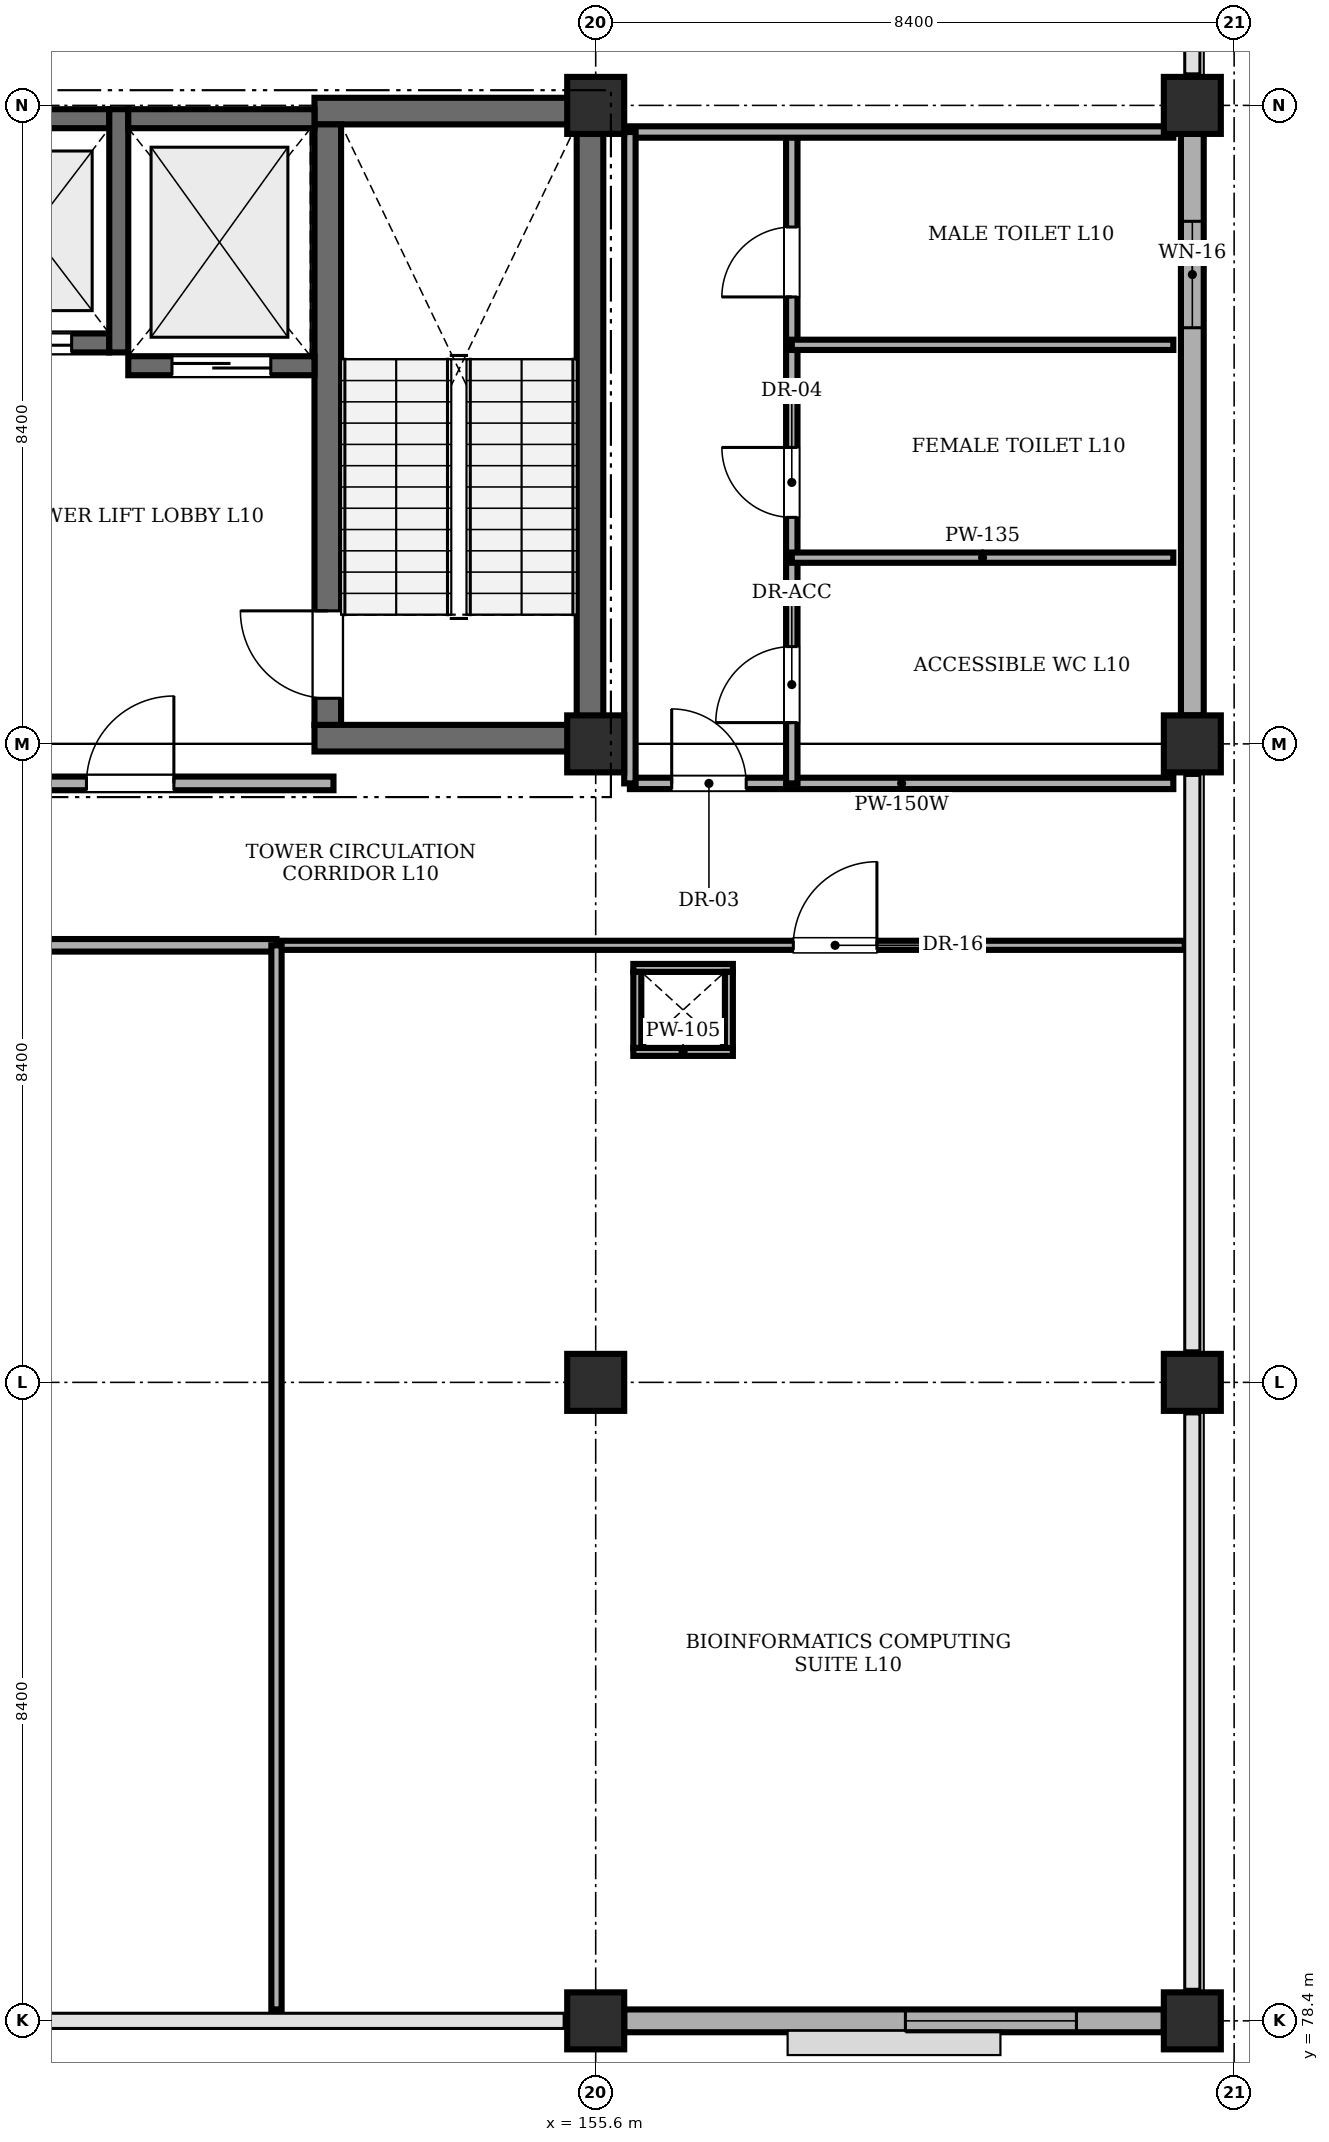
"""IFC4 building model, lengths in metres.
Left out: names, types, materials, properties, quantities, classifications, styles, units other than length and angle.
Written with IfcOpenShell. Run it as: python <this file> out.ifc"""

import sys

from ifc_helpers import new_model, si_unit, direction, frame, frame_2d, origin, origin_2d, place, context, subcontext, project, spatial, rectangle, extrude, element, fill, save


model = new_model("IFC4")
c1 = context("Model", 3, precision=1e-05, world=origin(), true_north=direction((0.0, 1.0)))
c2 = subcontext(c1, "Body", "Model", "MODEL_VIEW")
j1 = project(units=[si_unit("LENGTHUNIT", "METRE"), si_unit("PLANEANGLEUNIT", "RADIAN")], contexts=[c1])
p1 = place(None, origin())
s1 = spatial("IfcSite", under=j1, at=p1, CompositionType="ELEMENT")
p2 = place(p1, origin())
s2 = spatial("IfcBuilding", under=s1, at=p2, CompositionType="ELEMENT")
p3 = place(p2, frame((0.0, 0.0, 40.2)))
s3 = spatial("IfcBuildingStorey", under=s2, at=p3, CompositionType="ELEMENT", Elevation=40.2)
for number, where, z_axis, x_axis in (
    (1, (155.6, 78.4, 0.0), (0.0, 0.0, 1.0), (1.0, 0.0, 0.0)),
    (2, (155.6, 86.8, 0.0), (0.0, 0.0, 1.0), (1.0, 0.0, 0.0)),
    (3, (155.6, 95.2, 0.0), (0.0, 0.0, 1.0), (1.0, 0.0, 0.0)),
    (4, (155.6, 103.6, 0.0), (0.0, 0.0, 1.0), (1.0, 0.0, 0.0)),
    (5, (163.45, 78.4, 0.0), (0.0, 0.0, 1.0), (1.0, 0.0, 0.0)),
    (6, (163.45, 86.8, 0.0), (0.0, 0.0, 1.0), (1.0, 0.0, 0.0)),
    (7, (163.45, 95.2, 0.0), (0.0, 0.0, 1.0), (1.0, 0.0, 0.0)),
    (8, (163.45, 103.6, 0.0), (0.0, 0.0, 1.0), (1.0, 0.0, 0.0)),
):
    element("IfcColumn", number, at=place(p3, frame(where, z_axis=z_axis, x_axis=x_axis)), inside=s3, PredefinedType="COLUMN", context=c2, shape_type="SweptSolid", body=[
        extrude(rectangle(XDim=0.75, YDim=0.75, at=origin_2d()), origin(), (0.0, 0.0, 1.0), 4.0),
    ])
for number, where, z_axis, x_axis in (
    (9, (151.9, 95.275, 0.0), (0.0, 0.0, 1.0), (1.0, 0.0, 0.0)),
    (10, (151.9, 103.525, 0.0), (0.0, 0.0, 1.0), (1.0, 0.0, 0.0)),
):
    element("IfcWall", number, at=place(p3, frame(where, z_axis=z_axis, x_axis=x_axis)), inside=s3, PredefinedType="SHEAR", context=c2, shape_type="SweptSolid", body=[
        extrude(rectangle(XDim=3.8, YDim=0.35, at=frame_2d((1.9, 0.0))), origin(), (0.0, 0.0, 1.0), 4.0),
    ])
p4 = place(p3, frame((152.075, 95.45, 0.0), z_axis=(0.0, 0.0, 1.0), x_axis=(0.0, 1.0, 0.0)))
e11 = element("IfcWall", 11, at=p4, inside=s3, PredefinedType="SHEAR", context=c2, shape_type="SweptSolid", body=[
    extrude(rectangle(XDim=7.9, YDim=0.35, at=frame_2d((3.95, 0.0))), origin(), (0.0, 0.0, 1.0), 4.0),
])
p5 = place(p4, frame((0.35, 0.0, 0.0)))
e12 = element("IfcOpeningElement", 12, at=p5, cuts=e11, PredefinedType="OPENING", context=c2, shape_type="SweptSolid", body=[
    extrude(rectangle(XDim=1.15, YDim=2.15, at=frame_2d((0.575, 1.075))), frame((0.0, 0.185, 0.0), z_axis=(0.0, -1.0, 0.0), x_axis=(1.0, 0.0, 0.0)), (0.0, 0.0, 1.0), 0.37),
])
p6 = place(p3, frame((155.525, 95.45, 0.0), z_axis=(0.0, 0.0, 1.0), x_axis=(0.0, 1.0, 0.0)))
e13 = element("IfcWall", 13, at=p6, inside=s3, PredefinedType="SHEAR", context=c2, shape_type="SweptSolid", body=[
    extrude(rectangle(XDim=7.9, YDim=0.35, at=frame_2d((3.95, 0.0))), origin(), (0.0, 0.0, 1.0), 4.0),
])
p7 = place(p3, frame((147.15, 100.475, 0.0), z_axis=(0.0, 0.0, 1.0), x_axis=(1.0, 0.0, 0.0)))
e14 = element("IfcWall", 14, at=p7, inside=s3, PredefinedType="SHEAR", context=c2, shape_type="SweptSolid", body=[
    extrude(rectangle(XDim=2.05, YDim=0.25, at=frame_2d((1.025, 0.0))), origin(), (0.0, 0.0, 1.0), 4.0),
])
p8 = place(p7, frame((0.495, 0.0, 0.0)))
e15 = element("IfcOpeningElement", 15, at=p8, cuts=e14, PredefinedType="OPENING", context=c2, shape_type="SweptSolid", body=[
    extrude(rectangle(XDim=1.06, YDim=2.15, at=frame_2d((0.53, 1.075))), frame((0.0, 0.135, 0.0), z_axis=(0.0, -1.0, 0.0), x_axis=(1.0, 0.0, 0.0)), (0.0, 0.0, 1.0), 0.27),
])
p9 = place(p3, frame((147.15, 103.425, 0.0), z_axis=(0.0, 0.0, 1.0), x_axis=(1.0, 0.0, 0.0)))
e16 = element("IfcWall", 16, at=p9, inside=s3, PredefinedType="SHEAR", context=c2, shape_type="SweptSolid", body=[
    extrude(rectangle(XDim=2.05, YDim=0.25, at=frame_2d((1.025, 0.0))), origin(), (0.0, 0.0, 1.0), 4.0),
])
p10 = place(p3, frame((149.325, 100.35, 0.0), z_axis=(0.0, 0.0, 1.0), x_axis=(0.0, 1.0, 0.0)))
e17 = element("IfcWall", 17, at=p10, inside=s3, PredefinedType="SHEAR", context=c2, shape_type="SweptSolid", body=[
    extrude(rectangle(XDim=3.2, YDim=0.25, at=frame_2d((1.6, 0.0))), origin(), (0.0, 0.0, 1.0), 4.0),
])
p11 = place(p3, frame((149.45, 100.175, 0.0), z_axis=(0.0, 0.0, 1.0), x_axis=(1.0, 0.0, 0.0)))
e18 = element("IfcWall", 18, at=p11, inside=s3, PredefinedType="SHEAR", context=c2, shape_type="SweptSolid", body=[
    extrude(rectangle(XDim=2.45, YDim=0.25, at=frame_2d((1.225, 0.0))), origin(), (0.0, 0.0, 1.0), 4.0),
])
p12 = place(p11, frame((0.575, 0.0, 0.0)))
e19 = element("IfcOpeningElement", 19, at=p12, cuts=e18, PredefinedType="OPENING", context=c2, shape_type="SweptSolid", body=[
    extrude(rectangle(XDim=1.3, YDim=2.25, at=frame_2d((0.65, 1.125))), frame((0.0, 0.135, 0.0), z_axis=(0.0, -1.0, 0.0), x_axis=(1.0, 0.0, 0.0)), (0.0, 0.0, 1.0), 0.27),
])
p13 = place(p3, frame((149.45, 103.425, 0.0), z_axis=(0.0, 0.0, 1.0), x_axis=(1.0, 0.0, 0.0)))
e20 = element("IfcWall", 20, at=p13, inside=s3, PredefinedType="SHEAR", context=c2, shape_type="SweptSolid", body=[
    extrude(rectangle(XDim=2.45, YDim=0.25, at=frame_2d((1.225, 0.0))), origin(), (0.0, 0.0, 1.0), 4.0),
])
p14 = place(p3, frame((163.075, 78.4, 0.0), z_axis=(0.0, 0.0, 1.0), x_axis=(-1.0, 0.0, 0.0)))
e21 = element("IfcWall", 21, at=p14, inside=s3, PredefinedType="STANDARD", context=c2, shape_type="SweptSolid", body=[
    extrude(rectangle(XDim=7.1, YDim=0.3, at=frame_2d((3.55, 0.0))), origin(), (0.0, 0.0, 1.0), 3.3),
])
p15 = place(p14, frame((1.15, 0.0, 0.95)))
e22 = element("IfcOpeningElement", 22, at=p15, cuts=e21, PredefinedType="OPENING", context=c2, shape_type="SweptSolid", body=[
    extrude(rectangle(XDim=2.25, YDim=1.95, at=frame_2d((1.125, 0.975))), frame((0.0, 0.16, 0.0), z_axis=(0.0, -1.0, 0.0), x_axis=(1.0, 0.0, 0.0)), (0.0, 0.0, 1.0), 0.32),
])
p16 = place(p3, frame((163.45, 103.225, 0.0), z_axis=(0.0, 0.0, 1.0), x_axis=(0.0, -1.0, 0.0)))
e23 = element("IfcWall", 23, at=p16, inside=s3, PredefinedType="STANDARD", context=c2, shape_type="SweptSolid", body=[
    extrude(rectangle(XDim=7.65, YDim=0.3, at=frame_2d((3.825, 0.0))), origin(), (0.0, 0.0, 1.0), 3.3),
])
p17 = place(p16, frame((1.15, 0.0, 1.1)))
e24 = element("IfcOpeningElement", 24, at=p17, cuts=e23, PredefinedType="OPENING", context=c2, shape_type="SweptSolid", body=[
    extrude(rectangle(XDim=1.4, YDim=1.4, at=frame_2d((0.7, 0.7))), frame((0.0, 0.16, 0.0), z_axis=(0.0, -1.0, 0.0), x_axis=(1.0, 0.0, 0.0)), (0.0, 0.0, 1.0), 0.32),
])
p18 = place(p3, frame((147.3, 94.68, 0.0), z_axis=(0.0, 0.0, 1.0), x_axis=(1.0, 0.0, 0.0)))
e25 = element("IfcWall", 25, at=p18, inside=s3, PredefinedType="STANDARD", context=c2, shape_type="SweptSolid", body=[
    extrude(rectangle(XDim=4.85, YDim=0.18, at=frame_2d((2.425, 0.0))), origin(), (0.0, 0.0, 1.0), 4.0),
])
p19 = place(p18, frame((1.6, 0.0, 0.0)))
e26 = element("IfcOpeningElement", 26, at=p19, cuts=e25, PredefinedType="OPENING", context=c2, shape_type="SweptSolid", body=[
    extrude(rectangle(XDim=1.15, YDim=2.15, at=frame_2d((0.575, 1.075))), frame((0.0, 0.1, 0.0), z_axis=(0.0, -1.0, 0.0), x_axis=(1.0, 0.0, 0.0)), (0.0, 0.0, 1.0), 0.2),
])
p20 = place(p3, frame((156.05, 94.68, 0.0), z_axis=(0.0, 0.0, 1.0), x_axis=(1.0, 0.0, 0.0)))
e27 = element("IfcWall", 27, at=p20, inside=s3, PredefinedType="PARTITIONING", context=c2, shape_type="SweptSolid", body=[
    extrude(rectangle(XDim=7.15, YDim=0.15, at=frame_2d((3.575, 0.0))), origin(), (0.0, 0.0, 1.0), 4.0),
])
p21 = place(p20, frame((0.55, 0.0, 0.0)))
e28 = element("IfcOpeningElement", 28, at=p21, cuts=e27, PredefinedType="OPENING", context=c2, shape_type="SweptSolid", body=[
    extrude(rectangle(XDim=0.98, YDim=2.12, at=frame_2d((0.49, 1.06))), frame((0.0, 0.085, 0.0), z_axis=(0.0, -1.0, 0.0), x_axis=(1.0, 0.0, 0.0)), (0.0, 0.0, 1.0), 0.17),
])
p22 = place(p3, frame((158.18, 94.68, 0.0), z_axis=(0.0, 0.0, 1.0), x_axis=(0.0, 1.0, 0.0)))
e29 = element("IfcWall", 29, at=p22, inside=s3, PredefinedType="PARTITIONING", context=c2, shape_type="SweptSolid", body=[
    extrude(rectangle(XDim=8.57, YDim=0.15, at=frame_2d((4.285, 0.0))), origin(), (0.0, 0.0, 1.0), 4.0),
])
p23 = place(p22, frame((0.8, 0.0, 0.0)))
e30 = element("IfcOpeningElement", 30, at=p23, cuts=e29, PredefinedType="OPENING", context=c2, shape_type="SweptSolid", body=[
    extrude(rectangle(XDim=1.0, YDim=2.12, at=frame_2d((0.5, 1.06))), frame((0.0, 0.085, 0.0), z_axis=(0.0, -1.0, 0.0), x_axis=(1.0, 0.0, 0.0)), (0.0, 0.0, 1.0), 0.17),
])
p24 = place(p22, frame((3.5, 0.0, 0.0)))
e31 = element("IfcOpeningElement", 31, at=p24, cuts=e29, PredefinedType="OPENING", context=c2, shape_type="SweptSolid", body=[
    extrude(rectangle(XDim=0.92, YDim=2.1, at=frame_2d((0.46, 1.05))), frame((0.0, 0.085, 0.0), z_axis=(0.0, -1.0, 0.0), x_axis=(1.0, 0.0, 0.0)), (0.0, 0.0, 1.0), 0.17),
])
p25 = place(p22, frame((6.4, 0.0, 0.0)))
e32 = element("IfcOpeningElement", 32, at=p25, cuts=e29, PredefinedType="OPENING", context=c2, shape_type="SweptSolid", body=[
    extrude(rectangle(XDim=0.92, YDim=2.1, at=frame_2d((0.46, 1.05))), frame((0.0, 0.085, 0.0), z_axis=(0.0, -1.0, 0.0), x_axis=(1.0, 0.0, 0.0)), (0.0, 0.0, 1.0), 0.17),
])
for number, where, z_axis, x_axis in (
    (33, (158.18, 97.65, 0.0), (0.0, 0.0, 1.0), (1.0, 0.0, 0.0)),
    (34, (158.18, 100.45, 0.0), (0.0, 0.0, 1.0), (1.0, 0.0, 0.0)),
):
    element("IfcWall", number, at=place(p3, frame(where, z_axis=z_axis, x_axis=x_axis)), inside=s3, PredefinedType="PARTITIONING", context=c2, shape_type="SweptSolid", body=[
        extrude(rectangle(XDim=5.02, YDim=0.135, at=frame_2d((2.51, 0.0))), origin(), (0.0, 0.0, 1.0), 4.0),
    ])
p26 = place(p3, frame((156.05, 103.25, 0.0), z_axis=(0.0, 0.0, 1.0), x_axis=(1.0, 0.0, 0.0)))
e35 = element("IfcWall", 35, at=p26, inside=s3, PredefinedType="PARTITIONING", context=c2, shape_type="SweptSolid", body=[
    extrude(rectangle(XDim=7.15, YDim=0.15, at=frame_2d((3.575, 0.0))), origin(), (0.0, 0.0, 1.0), 4.0),
])
p27 = place(p3, frame((156.05, 94.68, 0.0), z_axis=(0.0, 0.0, 1.0), x_axis=(0.0, 1.0, 0.0)))
e36 = element("IfcWall", 36, at=p27, inside=s3, PredefinedType="PARTITIONING", context=c2, shape_type="SweptSolid", body=[
    extrude(rectangle(XDim=8.57, YDim=0.15, at=frame_2d((4.285, 0.0))), origin(), (0.0, 0.0, 1.0), 4.0),
])
p28 = place(p3, frame((138.8, 92.55, 0.0), z_axis=(0.0, 0.0, 1.0), x_axis=(1.0, 0.0, 0.0)))
e37 = element("IfcWall", 37, at=p28, inside=s3, PredefinedType="PARTITIONING", context=c2, shape_type="SweptSolid", body=[
    extrude(rectangle(XDim=12.6, YDim=0.165, at=frame_2d((6.3, 0.0))), origin(), (0.0, 0.0, 1.0), 4.0),
])
p29 = place(p28, frame((3.4, 0.0, 0.0)))
e38 = element("IfcOpeningElement", 38, at=p29, cuts=e37, PredefinedType="OPENING", context=c2, shape_type="SweptSolid", body=[
    extrude(rectangle(XDim=1.02, YDim=2.15, at=frame_2d((0.51, 1.075))), frame((0.0, 0.093, 0.0), z_axis=(0.0, -1.0, 0.0), x_axis=(1.0, 0.0, 0.0)), (0.0, 0.0, 1.0), 0.185),
])
p30 = place(p3, frame((151.4, 92.55, 0.0), z_axis=(0.0, 0.0, 1.0), x_axis=(1.0, 0.0, 0.0)))
e39 = element("IfcWall", 39, at=p30, inside=s3, PredefinedType="PARTITIONING", context=c2, shape_type="SweptSolid", body=[
    extrude(rectangle(XDim=11.95, YDim=0.12, at=frame_2d((5.975, 0.0))), origin(), (0.0, 0.0, 1.0), 4.0),
])
p31 = place(p30, frame((6.8, 0.0, 0.0)))
e40 = element("IfcOpeningElement", 40, at=p31, cuts=e39, PredefinedType="OPENING", context=c2, shape_type="SweptSolid", body=[
    extrude(rectangle(XDim=1.1, YDim=2.18, at=frame_2d((0.55, 1.09))), frame((0.0, 0.07, 0.0), z_axis=(0.0, -1.0, 0.0), x_axis=(1.0, 0.0, 0.0)), (0.0, 0.0, 1.0), 0.14),
])
p32 = place(p3, frame((151.4, 78.55, 0.0), z_axis=(0.0, 0.0, 1.0), x_axis=(0.0, 1.0, 0.0)))
e41 = element("IfcWall", 41, at=p32, inside=s3, PredefinedType="PARTITIONING", context=c2, shape_type="SweptSolid", body=[
    extrude(rectangle(XDim=14.0, YDim=0.135, at=frame_2d((7.0, 0.0))), origin(), (0.0, 0.0, 1.0), 3.55),
])
for number, where, z_axis, x_axis in (
    (42, (156.095, 91.147, 0.0), (0.0, 0.0, 1.0), (1.0, 0.0, 0.0)),
    (43, (156.095, 92.252, 0.0), (0.0, 0.0, 1.0), (1.0, 0.0, 0.0)),
):
    element("IfcWall", number, at=place(p3, frame(where, z_axis=z_axis, x_axis=x_axis)), inside=s3, PredefinedType="PARTITIONING", context=c2, shape_type="SweptSolid", body=[
        extrude(rectangle(XDim=1.31, YDim=0.105, at=frame_2d((0.655, 0.0))), origin(), (0.0, 0.0, 1.0), 4.0),
    ])
for number, where, z_axis, x_axis in (
    (44, (156.147, 91.2, 0.0), (0.0, 0.0, 1.0), (0.0, 1.0, 0.0)),
    (45, (157.353, 91.2, 0.0), (0.0, 0.0, 1.0), (0.0, 1.0, 0.0)),
):
    element("IfcWall", number, at=place(p3, frame(where, z_axis=z_axis, x_axis=x_axis)), inside=s3, PredefinedType="PARTITIONING", context=c2, shape_type="SweptSolid", body=[
        extrude(rectangle(XDim=1.0, YDim=0.105, at=frame_2d((0.5, 0.0))), origin(), (0.0, 0.0, 1.0), 4.0),
    ])
p33 = place(p15, origin())
e46 = element("IfcWindow", 46, at=p33, inside=s3, PartitioningType="TRIPLE_PANEL_VERTICAL", PredefinedType="WINDOW", context=c2, shape_type="SweptSolid", body=[
    extrude(rectangle(XDim=2.25, YDim=1.95, at=frame_2d((1.125, 0.975))), frame((0.0, 0.03, 0.0), z_axis=(0.0, -1.0, 0.0), x_axis=(1.0, 0.0, 0.0)), (0.0, 0.0, 1.0), 0.06),
])
fill(e22, e46)
p34 = place(p17, origin())
e47 = element("IfcWindow", 47, at=p34, inside=s3, PartitioningType="SINGLE_PANEL", PredefinedType="WINDOW", context=c2, shape_type="SweptSolid", body=[
    extrude(rectangle(XDim=1.4, YDim=1.4, at=frame_2d((0.7, 0.7))), frame((0.0, 0.03, 0.0), z_axis=(0.0, -1.0, 0.0), x_axis=(1.0, 0.0, 0.0)), (0.0, 0.0, 1.0), 0.06),
])
fill(e24, e47)
p35 = place(p19, origin())
e48 = element("IfcDoor", 48, at=p35, inside=s3, OperationType="SINGLE_SWING_RIGHT", PredefinedType="DOOR", context=c2, shape_type="SweptSolid", body=[
    extrude(rectangle(XDim=1.15, YDim=2.15, at=frame_2d((0.575, 1.075))), frame((0.0, 0.025, 0.0), z_axis=(0.0, -1.0, 0.0), x_axis=(1.0, 0.0, 0.0)), (0.0, 0.0, 1.0), 0.05),
])
fill(e26, e48)
p36 = place(p21, origin())
e49 = element("IfcDoor", 49, at=p36, inside=s3, OperationType="SINGLE_SWING_LEFT", PredefinedType="DOOR", context=c2, shape_type="SweptSolid", body=[
    extrude(rectangle(XDim=0.98, YDim=2.12, at=frame_2d((0.49, 1.06))), frame((0.0, 0.025, 0.0), z_axis=(0.0, -1.0, 0.0), x_axis=(1.0, 0.0, 0.0)), (0.0, 0.0, 1.0), 0.05),
])
fill(e28, e49)
p37 = place(p23, origin())
e50 = element("IfcDoor", 50, at=p37, inside=s3, OperationType="SINGLE_SWING_LEFT", PredefinedType="DOOR", context=c2, shape_type="SweptSolid", body=[
    extrude(rectangle(XDim=1.0, YDim=2.12, at=frame_2d((0.5, 1.06))), frame((0.0, 0.025, 0.0), z_axis=(0.0, -1.0, 0.0), x_axis=(1.0, 0.0, 0.0)), (0.0, 0.0, 1.0), 0.05),
])
fill(e30, e50)
p38 = place(p24, origin())
e51 = element("IfcDoor", 51, at=p38, inside=s3, OperationType="SINGLE_SWING_RIGHT", PredefinedType="DOOR", context=c2, shape_type="SweptSolid", body=[
    extrude(rectangle(XDim=0.92, YDim=2.1, at=frame_2d((0.46, 1.05))), frame((0.0, 0.025, 0.0), z_axis=(0.0, -1.0, 0.0), x_axis=(1.0, 0.0, 0.0)), (0.0, 0.0, 1.0), 0.05),
])
fill(e31, e51)
p39 = place(p25, origin())
e52 = element("IfcDoor", 52, at=p39, inside=s3, OperationType="SINGLE_SWING_LEFT", PredefinedType="DOOR", context=c2, shape_type="SweptSolid", body=[
    extrude(rectangle(XDim=0.92, YDim=2.1, at=frame_2d((0.46, 1.05))), frame((0.0, 0.025, 0.0), z_axis=(0.0, -1.0, 0.0), x_axis=(1.0, 0.0, 0.0)), (0.0, 0.0, 1.0), 0.05),
])
fill(e32, e52)
p40 = place(p31, origin())
e53 = element("IfcDoor", 53, at=p40, inside=s3, OperationType="SINGLE_SWING_RIGHT", PredefinedType="DOOR", context=c2, shape_type="SweptSolid", body=[
    extrude(rectangle(XDim=1.1, YDim=2.18, at=frame_2d((0.55, 1.09))), frame((0.0, 0.025, 0.0), z_axis=(0.0, -1.0, 0.0), x_axis=(1.0, 0.0, 0.0)), (0.0, 0.0, 1.0), 0.05),
])
fill(e40, e53)
p41 = place(p5, origin())
e54 = element("IfcDoor", 54, at=p41, inside=s3, OperationType="SINGLE_SWING_RIGHT", PredefinedType="DOOR", context=c2, shape_type="SweptSolid", body=[
    extrude(rectangle(XDim=1.15, YDim=2.15, at=frame_2d((0.575, 1.075))), frame((0.0, 0.025, 0.0), z_axis=(0.0, -1.0, 0.0), x_axis=(1.0, 0.0, 0.0)), (0.0, 0.0, 1.0), 0.05),
])
fill(e12, e54)
p42 = place(p8, origin())
e55 = element("IfcDoor", 55, at=p42, inside=s3, OperationType="SLIDING_TO_LEFT", PredefinedType="DOOR", context=c2, shape_type="SweptSolid", body=[
    extrude(rectangle(XDim=1.06, YDim=2.15, at=frame_2d((0.53, 1.075))), frame((0.0, 0.025, 0.0), z_axis=(0.0, -1.0, 0.0), x_axis=(1.0, 0.0, 0.0)), (0.0, 0.0, 1.0), 0.05),
])
fill(e15, e55)
p43 = place(p12, origin())
e56 = element("IfcDoor", 56, at=p43, inside=s3, OperationType="SLIDING_TO_LEFT", PredefinedType="DOOR", context=c2, shape_type="SweptSolid", body=[
    extrude(rectangle(XDim=1.3, YDim=2.25, at=frame_2d((0.65, 1.125))), frame((0.0, 0.025, 0.0), z_axis=(0.0, -1.0, 0.0), x_axis=(1.0, 0.0, 0.0)), (0.0, 0.0, 1.0), 0.05),
])
fill(e19, e56)
save(model, sys.argv[1])
